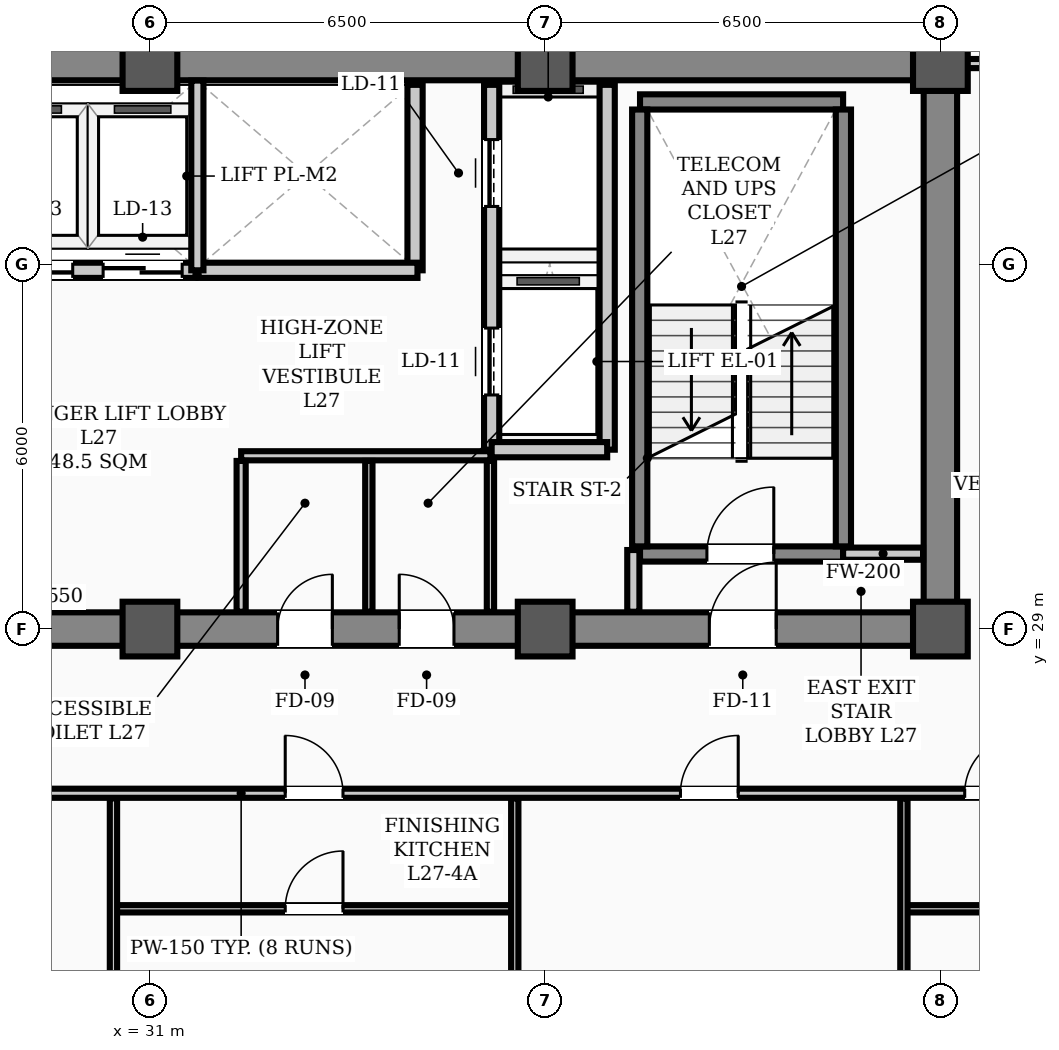
"""IFC4 building model, lengths in metres.
Left out: names, types, materials, properties, quantities, classifications, styles, units other than length and angle.
Written with IfcOpenShell. Run it as: python <this file> out.ifc"""

import sys

from ifc_helpers import new_model, si_unit, direction, frame, frame_2d, origin, origin_2d, place, context, subcontext, project, spatial, rectangle, hollow_rectangle, extrude, element, fill, save


model = new_model("IFC4")
c1 = context("Model", 3, precision=1e-05, world=origin(), true_north=direction((0.0, 1.0)))
c2 = subcontext(c1, "Body", "Model", "MODEL_VIEW")
j1 = project(units=[si_unit("LENGTHUNIT", "METRE"), si_unit("PLANEANGLEUNIT", "RADIAN")], contexts=[c1])
p1 = place(None, origin())
s1 = spatial("IfcSite", under=j1, at=p1, CompositionType="ELEMENT")
p2 = place(p1, origin())
s2 = spatial("IfcBuilding", under=s1, at=p2, CompositionType="ELEMENT")
p3 = place(p2, frame((0.0, 0.0, 111.0)))
s3 = spatial("IfcBuildingStorey", under=s2, at=p3, CompositionType="ELEMENT", Elevation=111.0)
for number, where, z_axis, x_axis in (
    (1, (31.0, 29.0, 0.0), (0.0, 0.0, 1.0), (1.0, 0.0, 0.0)),
    (2, (31.0, 38.3, 0.0), (0.0, 0.0, 1.0), (1.0, 0.0, 0.0)),
    (3, (37.5, 29.0, 0.0), (0.0, 0.0, 1.0), (1.0, 0.0, 0.0)),
    (4, (37.5, 38.3, 0.0), (0.0, 0.0, 1.0), (1.0, 0.0, 0.0)),
    (5, (44.0, 29.0, 0.0), (0.0, 0.0, 1.0), (1.0, 0.0, 0.0)),
    (6, (44.0, 38.3, 0.0), (0.0, 0.0, 1.0), (1.0, 0.0, 0.0)),
):
    element("IfcColumn", number, at=place(p3, frame(where, z_axis=z_axis, x_axis=x_axis)), inside=s3, PredefinedType="COLUMN", context=c2, shape_type="SweptSolid", body=[
        extrude(hollow_rectangle(XDim=0.9, YDim=0.9, WallThickness=0.035, InnerFilletRadius=0.017, OuterFilletRadius=0.052, at=origin_2d()), origin(), (0.0, 0.0, 1.0), 3.9),
    ])
p4 = place(p3, frame((13.5, 29.0, 0.0), z_axis=(0.0, 0.0, 1.0), x_axis=(1.0, 0.0, 0.0)))
e7 = element("IfcWall", 7, at=p4, inside=s3, PredefinedType="SHEAR", context=c2, shape_type="SweptSolid", body=[
    extrude(rectangle(XDim=30.5, YDim=0.55, at=frame_2d((15.25, 0.0))), origin(), (0.0, 0.0, 1.0), 3.66),
])
p5 = place(p4, frame((1.75, 0.0, 0.0)))
e8 = element("IfcOpeningElement", 8, at=p5, cuts=e7, PredefinedType="OPENING", context=c2, shape_type="SweptSolid", body=[
    extrude(rectangle(XDim=1.1, YDim=2.08, at=frame_2d((0.55, 1.04))), frame((0.0, 0.285, 0.0), z_axis=(0.0, -1.0, 0.0), x_axis=(1.0, 0.0, 0.0)), (0.0, 0.0, 1.0), 0.57),
])
p6 = place(p4, frame((26.7, 0.0, 0.0)))
e9 = element("IfcOpeningElement", 9, at=p6, cuts=e7, PredefinedType="OPENING", context=c2, shape_type="SweptSolid", body=[
    extrude(rectangle(XDim=1.1, YDim=2.08, at=frame_2d((0.55, 1.04))), frame((0.0, 0.285, 0.0), z_axis=(0.0, -1.0, 0.0), x_axis=(1.0, 0.0, 0.0)), (0.0, 0.0, 1.0), 0.57),
])
p7 = place(p4, frame((6.8, 0.0, 0.0)))
e10 = element("IfcOpeningElement", 10, at=p7, cuts=e7, PredefinedType="OPENING", context=c2, shape_type="SweptSolid", body=[
    extrude(rectangle(XDim=1.1, YDim=2.08, at=frame_2d((0.55, 1.04))), frame((0.0, 0.285, 0.0), z_axis=(0.0, -1.0, 0.0), x_axis=(1.0, 0.0, 0.0)), (0.0, 0.0, 1.0), 0.57),
])
p8 = place(p4, frame((13.2, 0.0, 0.0)))
e11 = element("IfcOpeningElement", 11, at=p8, cuts=e7, PredefinedType="OPENING", context=c2, shape_type="SweptSolid", body=[
    extrude(rectangle(XDim=1.6, YDim=2.08, at=frame_2d((0.8, 1.04))), frame((0.0, 0.285, 0.0), z_axis=(0.0, -1.0, 0.0), x_axis=(1.0, 0.0, 0.0)), (0.0, 0.0, 1.0), 0.57),
])
p9 = place(p4, frame((19.6, 0.0, 0.0)))
e12 = element("IfcOpeningElement", 12, at=p9, cuts=e7, PredefinedType="OPENING", context=c2, shape_type="SweptSolid", body=[
    extrude(rectangle(XDim=0.9, YDim=2.08, at=frame_2d((0.45, 1.04))), frame((0.0, 0.285, 0.0), z_axis=(0.0, -1.0, 0.0), x_axis=(1.0, 0.0, 0.0)), (0.0, 0.0, 1.0), 0.57),
])
p10 = place(p4, frame((21.6, 0.0, 0.0)))
e13 = element("IfcOpeningElement", 13, at=p10, cuts=e7, PredefinedType="OPENING", context=c2, shape_type="SweptSolid", body=[
    extrude(rectangle(XDim=0.9, YDim=2.08, at=frame_2d((0.45, 1.04))), frame((0.0, 0.285, 0.0), z_axis=(0.0, -1.0, 0.0), x_axis=(1.0, 0.0, 0.0)), (0.0, 0.0, 1.0), 0.57),
])
p11 = place(p3, frame((13.5, 38.3, 0.0), z_axis=(0.0, 0.0, 1.0), x_axis=(1.0, 0.0, 0.0)))
e14 = element("IfcWall", 14, at=p11, inside=s3, PredefinedType="SHEAR", context=c2, shape_type="SweptSolid", body=[
    extrude(rectangle(XDim=30.5, YDim=0.55, at=frame_2d((15.25, 0.0))), origin(), (0.0, 0.0, 1.0), 3.66),
])
p12 = place(p3, frame((44.0, 29.35, 0.0), z_axis=(0.0, 0.0, 1.0), x_axis=(0.0, 1.0, 0.0)))
e15 = element("IfcWall", 15, at=p12, inside=s3, PredefinedType="SHEAR", context=c2, shape_type="SweptSolid", body=[
    extrude(rectangle(XDim=8.6, YDim=0.55, at=frame_2d((4.3, 0.0))), origin(), (0.0, 0.0, 1.0), 3.66),
])
p13 = place(p3, frame((39.06, 30.235, 0.0), z_axis=(0.0, 0.0, 1.0), x_axis=(1.0, 0.0, 0.0)))
e16 = element("IfcWall", 16, at=p13, inside=s3, PredefinedType="STANDARD", context=c2, shape_type="SweptSolid", body=[
    extrude(rectangle(XDim=3.34, YDim=0.25, at=frame_2d((1.67, 0.0))), origin(), (0.0, 0.0, 1.0), 3.66),
])
p14 = place(p13, frame((1.1, 0.0, 0.0)))
e17 = element("IfcOpeningElement", 17, at=p14, cuts=e16, PredefinedType="OPENING", context=c2, shape_type="SweptSolid", body=[
    extrude(rectangle(XDim=1.1, YDim=2.08, at=frame_2d((0.55, 1.04))), frame((0.0, 0.135, 0.0), z_axis=(0.0, -1.0, 0.0), x_axis=(1.0, 0.0, 0.0)), (0.0, 0.0, 1.0), 0.27),
])
p15 = place(p3, frame((39.06, 37.669, 0.0), z_axis=(0.0, 0.0, 1.0), x_axis=(1.0, 0.0, 0.0)))
e18 = element("IfcWall", 18, at=p15, inside=s3, PredefinedType="STANDARD", context=c2, shape_type="SweptSolid", body=[
    extrude(rectangle(XDim=3.34, YDim=0.25, at=frame_2d((1.67, 0.0))), origin(), (0.0, 0.0, 1.0), 3.66),
])
for number, where, z_axis, x_axis in (
    (19, (39.055, 30.36, 0.0), (0.0, 0.0, 1.0), (0.0, 1.0, 0.0)),
    (20, (42.405, 30.36, 0.0), (0.0, 0.0, 1.0), (0.0, 1.0, 0.0)),
):
    element("IfcWall", number, at=place(p3, frame(where, z_axis=z_axis, x_axis=x_axis)), inside=s3, PredefinedType="STANDARD", context=c2, shape_type="SweptSolid", body=[
        extrude(rectangle(XDim=7.184, YDim=0.25, at=frame_2d((3.592, 0.0))), origin(), (0.0, 0.0, 1.0), 3.66),
    ])
p16 = place(p3, frame((36.62, 31.95, 0.0), z_axis=(0.0, 0.0, 1.0), x_axis=(0.0, 1.0, 0.0)))
e21 = element("IfcWall", 21, at=p16, inside=s3, PredefinedType="STANDARD", context=c2, shape_type="SweptSolid", body=[
    extrude(rectangle(XDim=6.0, YDim=0.25, at=frame_2d((3.0, 0.0))), origin(), (0.0, 0.0, 1.0), 2.24),
])
p17 = place(p16, frame((0.9, 0.0, 0.0)))
e22 = element("IfcOpeningElement", 22, at=p17, cuts=e21, PredefinedType="OPENING", context=c2, shape_type="SweptSolid", body=[
    extrude(rectangle(XDim=1.1, YDim=2.08, at=frame_2d((0.55, 1.04))), frame((0.0, 0.135, 0.0), z_axis=(0.0, -1.0, 0.0), x_axis=(1.0, 0.0, 0.0)), (0.0, 0.0, 1.0), 0.27),
])
p18 = place(p16, frame((4.0, 0.0, 0.0)))
e23 = element("IfcOpeningElement", 23, at=p18, cuts=e21, PredefinedType="OPENING", context=c2, shape_type="SweptSolid", body=[
    extrude(rectangle(XDim=1.1, YDim=2.08, at=frame_2d((0.55, 1.04))), frame((0.0, 0.135, 0.0), z_axis=(0.0, -1.0, 0.0), x_axis=(1.0, 0.0, 0.0)), (0.0, 0.0, 1.0), 0.27),
])
p19 = place(p3, frame((38.52, 31.95, 0.0), z_axis=(0.0, 0.0, 1.0), x_axis=(0.0, 1.0, 0.0)))
e24 = element("IfcWall", 24, at=p19, inside=s3, PredefinedType="STANDARD", context=c2, shape_type="SweptSolid", body=[
    extrude(rectangle(XDim=6.0, YDim=0.25, at=frame_2d((3.0, 0.0))), origin(), (0.0, 0.0, 1.0), 2.24),
])
p20 = place(p3, frame((36.62, 31.95, 0.0), z_axis=(0.0, 0.0, 1.0), x_axis=(1.0, 0.0, 0.0)))
e25 = element("IfcWall", 25, at=p20, inside=s3, PredefinedType="STANDARD", context=c2, shape_type="SweptSolid", body=[
    extrude(rectangle(XDim=1.9, YDim=0.25, at=frame_2d((0.95, 0.0))), origin(), (0.0, 0.0, 1.0), 3.48),
])
p21 = place(p3, frame((35.36, 34.9, 0.0), z_axis=(0.0, 0.0, 1.0), x_axis=(0.0, 1.0, 0.0)))
e26 = element("IfcWall", 26, at=p21, inside=s3, PredefinedType="STANDARD", context=c2, shape_type="SweptSolid", body=[
    extrude(rectangle(XDim=3.05, YDim=0.25, at=frame_2d((1.525, 0.0))), origin(), (0.0, 0.0, 1.0), 2.24),
])
p22 = place(p3, frame((28.2, 34.9, 0.0), z_axis=(0.0, 0.0, 1.0), x_axis=(1.0, 0.0, 0.0)))
e27 = element("IfcWall", 27, at=p22, inside=s3, PredefinedType="STANDARD", context=c2, shape_type="SweptSolid", body=[
    extrude(rectangle(XDim=3.55, YDim=0.25, at=frame_2d((1.775, 0.0))), origin(), (0.0, 0.0, 1.0), 3.66),
])
p23 = place(p22, frame((0.23, 0.0, 0.0)))
e28 = element("IfcOpeningElement", 28, at=p23, cuts=e27, PredefinedType="OPENING", context=c2, shape_type="SweptSolid", body=[
    extrude(rectangle(XDim=1.3, YDim=2.08, at=frame_2d((0.65, 1.04))), frame((0.0, 0.135, 0.0), z_axis=(0.0, -1.0, 0.0), x_axis=(1.0, 0.0, 0.0)), (0.0, 0.0, 1.0), 0.27),
])
p24 = place(p22, frame((2.03, 0.0, 0.0)))
e29 = element("IfcOpeningElement", 29, at=p24, cuts=e27, PredefinedType="OPENING", context=c2, shape_type="SweptSolid", body=[
    extrude(rectangle(XDim=1.3, YDim=2.08, at=frame_2d((0.65, 1.04))), frame((0.0, 0.135, 0.0), z_axis=(0.0, -1.0, 0.0), x_axis=(1.0, 0.0, 0.0)), (0.0, 0.0, 1.0), 0.27),
])
p25 = place(p3, frame((31.8, 34.9, 0.0), z_axis=(0.0, 0.0, 1.0), x_axis=(1.0, 0.0, 0.0)))
e30 = element("IfcWall", 30, at=p25, inside=s3, PredefinedType="STANDARD", context=c2, shape_type="SweptSolid", body=[
    extrude(rectangle(XDim=3.6, YDim=0.25, at=frame_2d((1.8, 0.0))), origin(), (0.0, 0.0, 1.0), 3.66),
])
p26 = place(p3, frame((42.4, 30.24, 0.0), z_axis=(0.0, 0.0, 1.0), x_axis=(1.0, 0.0, 0.0)))
e31 = element("IfcWall", 31, at=p26, inside=s3, PredefinedType="STANDARD", context=c2, shape_type="SweptSolid", body=[
    extrude(rectangle(XDim=1.315, YDim=0.2, at=frame_2d((0.658, 0.0))), origin(), (0.0, 0.0, 1.0), 2.24),
])
p27 = place(p3, frame((32.5, 31.85, 0.0), z_axis=(0.0, 0.0, 1.0), x_axis=(1.0, 0.0, 0.0)))
e32 = element("IfcWall", 32, at=p27, inside=s3, PredefinedType="PARTITIONING", context=c2, shape_type="SweptSolid", body=[
    extrude(rectangle(XDim=4.1, YDim=0.15, at=frame_2d((2.05, 0.0))), origin(), (0.0, 0.0, 1.0), 3.66),
])
p28 = place(p3, frame((7.81, 26.3, 0.0), z_axis=(0.0, 0.0, 1.0), x_axis=(1.0, 0.0, 0.0)))
e33 = element("IfcWall", 33, at=p28, inside=s3, PredefinedType="PARTITIONING", context=c2, shape_type="SweptSolid", body=[
    extrude(rectangle(XDim=49.38, YDim=0.15, at=frame_2d((24.69, 0.0))), origin(), (0.0, 0.0, 1.0), 2.24),
])
p29 = place(p28, frame((6.89, 0.0, 0.0)))
e34 = element("IfcOpeningElement", 34, at=p29, cuts=e33, PredefinedType="OPENING", context=c2, shape_type="SweptSolid", body=[
    extrude(rectangle(XDim=0.95, YDim=2.08, at=frame_2d((0.475, 1.04))), frame((0.0, 0.085, 0.0), z_axis=(0.0, -1.0, 0.0), x_axis=(1.0, 0.0, 0.0)), (0.0, 0.0, 1.0), 0.17),
])
p30 = place(p28, frame((12.315, 0.0, 0.0)))
e35 = element("IfcOpeningElement", 35, at=p30, cuts=e33, PredefinedType="OPENING", context=c2, shape_type="SweptSolid", body=[
    extrude(rectangle(XDim=0.95, YDim=2.08, at=frame_2d((0.475, 1.04))), frame((0.0, 0.085, 0.0), z_axis=(0.0, -1.0, 0.0), x_axis=(1.0, 0.0, 0.0)), (0.0, 0.0, 1.0), 0.17),
])
p31 = place(p28, frame((18.815, 0.0, 0.0)))
e36 = element("IfcOpeningElement", 36, at=p31, cuts=e33, PredefinedType="OPENING", context=c2, shape_type="SweptSolid", body=[
    extrude(rectangle(XDim=0.95, YDim=2.08, at=frame_2d((0.475, 1.04))), frame((0.0, 0.085, 0.0), z_axis=(0.0, -1.0, 0.0), x_axis=(1.0, 0.0, 0.0)), (0.0, 0.0, 1.0), 0.17),
])
p32 = place(p28, frame((25.415, 0.0, 0.0)))
e37 = element("IfcOpeningElement", 37, at=p32, cuts=e33, PredefinedType="OPENING", context=c2, shape_type="SweptSolid", body=[
    extrude(rectangle(XDim=0.95, YDim=2.08, at=frame_2d((0.475, 1.04))), frame((0.0, 0.085, 0.0), z_axis=(0.0, -1.0, 0.0), x_axis=(1.0, 0.0, 0.0)), (0.0, 0.0, 1.0), 0.17),
])
p33 = place(p28, frame((31.915, 0.0, 0.0)))
e38 = element("IfcOpeningElement", 38, at=p33, cuts=e33, PredefinedType="OPENING", context=c2, shape_type="SweptSolid", body=[
    extrude(rectangle(XDim=0.95, YDim=2.08, at=frame_2d((0.475, 1.04))), frame((0.0, 0.085, 0.0), z_axis=(0.0, -1.0, 0.0), x_axis=(1.0, 0.0, 0.0)), (0.0, 0.0, 1.0), 0.17),
])
p34 = place(p28, frame((36.59, 0.0, 0.0)))
e39 = element("IfcOpeningElement", 39, at=p34, cuts=e33, PredefinedType="OPENING", context=c2, shape_type="SweptSolid", body=[
    extrude(rectangle(XDim=0.95, YDim=2.08, at=frame_2d((0.475, 1.04))), frame((0.0, 0.085, 0.0), z_axis=(0.0, -1.0, 0.0), x_axis=(1.0, 0.0, 0.0)), (0.0, 0.0, 1.0), 0.17),
])
p35 = place(p3, frame((44.0, 38.3, 0.0), z_axis=(0.0, 0.0, 1.0), x_axis=(1.0, 0.0, 0.0)))
e40 = element("IfcWall", 40, at=p35, inside=s3, PredefinedType="PARTITIONING", context=c2, shape_type="SweptSolid", body=[
    extrude(rectangle(XDim=13.19, YDim=0.15, at=frame_2d((6.595, 0.0))), origin(), (0.0, 0.0, 1.0), 2.24),
])
p36 = place(p3, frame((30.4, 24.4, 0.0), z_axis=(0.0, 0.0, 1.0), x_axis=(1.0, 0.0, 0.0)))
e41 = element("IfcWall", 41, at=p36, inside=s3, PredefinedType="PARTITIONING", context=c2, shape_type="SweptSolid", body=[
    extrude(rectangle(XDim=6.6, YDim=0.12, at=frame_2d((3.3, 0.0))), origin(), (0.0, 0.0, 1.0), 2.24),
])
p37 = place(p36, frame((2.825, 0.0, 0.0)))
e42 = element("IfcOpeningElement", 42, at=p37, cuts=e41, PredefinedType="OPENING", context=c2, shape_type="SweptSolid", body=[
    extrude(rectangle(XDim=0.95, YDim=2.08, at=frame_2d((0.475, 1.04))), frame((0.0, 0.07, 0.0), z_axis=(0.0, -1.0, 0.0), x_axis=(1.0, 0.0, 0.0)), (0.0, 0.0, 1.0), 0.14),
])
p38 = place(p3, frame((43.4, 24.4, 0.0), z_axis=(0.0, 0.0, 1.0), x_axis=(1.0, 0.0, 0.0)))
e43 = element("IfcWall", 43, at=p38, inside=s3, PredefinedType="PARTITIONING", context=c2, shape_type="SweptSolid", body=[
    extrude(rectangle(XDim=13.79, YDim=0.12, at=frame_2d((6.895, 0.0))), origin(), (0.0, 0.0, 1.0), 2.24),
])
p39 = place(p38, frame((6.42, 0.0, 0.0)))
e44 = element("IfcOpeningElement", 44, at=p39, cuts=e43, PredefinedType="OPENING", context=c2, shape_type="SweptSolid", body=[
    extrude(rectangle(XDim=0.95, YDim=2.08, at=frame_2d((0.475, 1.04))), frame((0.0, 0.07, 0.0), z_axis=(0.0, -1.0, 0.0), x_axis=(1.0, 0.0, 0.0)), (0.0, 0.0, 1.0), 0.14),
])
p40 = place(p3, frame((38.95, 29.285, 0.0), z_axis=(0.0, 0.0, 1.0), x_axis=(0.0, 1.0, 0.0)))
e45 = element("IfcWall", 45, at=p40, inside=s3, PredefinedType="STANDARD", context=c2, shape_type="SweptSolid", body=[
    extrude(rectangle(XDim=1.015, YDim=0.2, at=frame_2d((0.508, 0.0))), origin(), (0.0, 0.0, 1.0), 2.24),
])
p41 = place(p3, frame((32.5, 29.285, 0.0), z_axis=(0.0, 0.0, 1.0), x_axis=(0.0, 1.0, 0.0)))
e46 = element("IfcWall", 46, at=p41, inside=s3, PredefinedType="PARTITIONING", context=c2, shape_type="SweptSolid", body=[
    extrude(rectangle(XDim=2.48, YDim=0.15, at=frame_2d((1.24, 0.0))), origin(), (0.0, 0.0, 1.0), 2.24),
])
for number, where, z_axis, x_axis in (
    (47, (36.6, 29.285, 0.0), (0.0, 0.0, 1.0), (0.0, 1.0, 0.0)),
    (48, (34.6, 29.285, 0.0), (0.0, 0.0, 1.0), (0.0, 1.0, 0.0)),
):
    element("IfcWall", number, at=place(p3, frame(where, z_axis=z_axis, x_axis=x_axis)), inside=s3, PredefinedType="PARTITIONING", context=c2, shape_type="SweptSolid", body=[
        extrude(rectangle(XDim=2.48, YDim=0.12, at=frame_2d((1.24, 0.0))), origin(), (0.0, 0.0, 1.0), 2.24),
    ])
for number, where, z_axis, x_axis in (
    (49, (30.4, 9.81, 0.0), (0.0, 0.0, 1.0), (0.0, 1.0, 0.0)),
    (50, (37.0, 9.81, 0.0), (0.0, 0.0, 1.0), (0.0, 1.0, 0.0)),
    (51, (43.4, 9.81, 0.0), (0.0, 0.0, 1.0), (0.0, 1.0, 0.0)),
):
    element("IfcWall", number, at=place(p3, frame(where, z_axis=z_axis, x_axis=x_axis)), inside=s3, PredefinedType="PARTITIONING", context=c2, shape_type="SweptSolid", body=[
        extrude(rectangle(XDim=16.405, YDim=0.12, at=frame_2d((8.203, 0.0))), origin(), (0.0, 0.0, 1.0), 2.24),
    ])
p42 = place(p3, frame((31.78, 34.9, 0.0), z_axis=(0.0, 0.0, 1.0), x_axis=(0.0, 1.0, 0.0)))
e52 = element("IfcWall", 52, at=p42, inside=s3, PredefinedType="STANDARD", context=c2, shape_type="SweptSolid", body=[
    extrude(rectangle(XDim=3.12, YDim=0.2, at=frame_2d((1.56, 0.0))), origin(), (0.0, 0.0, 1.0), 2.24),
])
p43 = place(p14, origin())
e53 = element("IfcDoor", 53, at=p43, inside=s3, OperationType="SINGLE_SWING_RIGHT", PredefinedType="DOOR", context=c2, shape_type="SweptSolid", body=[
    extrude(rectangle(XDim=1.1, YDim=2.08, at=frame_2d((0.55, 1.04))), frame((0.0, 0.025, 0.0), z_axis=(0.0, -1.0, 0.0), x_axis=(1.0, 0.0, 0.0)), (0.0, 0.0, 1.0), 0.05),
])
fill(e17, e53)
p44 = place(p6, origin())
e54 = element("IfcDoor", 54, at=p44, inside=s3, OperationType="SINGLE_SWING_RIGHT", PredefinedType="DOOR", context=c2, shape_type="SweptSolid", body=[
    extrude(rectangle(XDim=1.1, YDim=2.08, at=frame_2d((0.55, 1.04))), frame((0.0, 0.025, 0.0), z_axis=(0.0, -1.0, 0.0), x_axis=(1.0, 0.0, 0.0)), (0.0, 0.0, 1.0), 0.05),
])
fill(e9, e54)
p45 = place(p9, origin())
e55 = element("IfcDoor", 55, at=p45, inside=s3, OperationType="SINGLE_SWING_RIGHT", PredefinedType="DOOR", context=c2, shape_type="SweptSolid", body=[
    extrude(rectangle(XDim=0.9, YDim=2.08, at=frame_2d((0.45, 1.04))), frame((0.0, 0.025, 0.0), z_axis=(0.0, -1.0, 0.0), x_axis=(1.0, 0.0, 0.0)), (0.0, 0.0, 1.0), 0.05),
])
fill(e12, e55)
p46 = place(p10, origin())
e56 = element("IfcDoor", 56, at=p46, inside=s3, OperationType="SINGLE_SWING_LEFT", PredefinedType="DOOR", context=c2, shape_type="SweptSolid", body=[
    extrude(rectangle(XDim=0.9, YDim=2.08, at=frame_2d((0.45, 1.04))), frame((0.0, 0.025, 0.0), z_axis=(0.0, -1.0, 0.0), x_axis=(1.0, 0.0, 0.0)), (0.0, 0.0, 1.0), 0.05),
])
fill(e13, e56)
p47 = place(p37, origin())
e57 = element("IfcDoor", 57, at=p47, inside=s3, OperationType="SINGLE_SWING_RIGHT", PredefinedType="DOOR", context=c2, shape_type="SweptSolid", body=[
    extrude(rectangle(XDim=0.95, YDim=2.08, at=frame_2d((0.475, 1.04))), frame((0.0, 0.025, 0.0), z_axis=(0.0, -1.0, 0.0), x_axis=(1.0, 0.0, 0.0)), (0.0, 0.0, 1.0), 0.05),
])
fill(e42, e57)
p48 = place(p32, origin())
e58 = element("IfcDoor", 58, at=p48, inside=s3, OperationType="SINGLE_SWING_LEFT", PredefinedType="DOOR", context=c2, shape_type="SweptSolid", body=[
    extrude(rectangle(XDim=0.95, YDim=2.08, at=frame_2d((0.475, 1.04))), frame((0.0, 0.025, 0.0), z_axis=(0.0, -1.0, 0.0), x_axis=(1.0, 0.0, 0.0)), (0.0, 0.0, 1.0), 0.05),
])
fill(e37, e58)
p49 = place(p33, origin())
e59 = element("IfcDoor", 59, at=p49, inside=s3, OperationType="SINGLE_SWING_RIGHT", PredefinedType="DOOR", context=c2, shape_type="SweptSolid", body=[
    extrude(rectangle(XDim=0.95, YDim=2.08, at=frame_2d((0.475, 1.04))), frame((0.0, 0.025, 0.0), z_axis=(0.0, -1.0, 0.0), x_axis=(1.0, 0.0, 0.0)), (0.0, 0.0, 1.0), 0.05),
])
fill(e38, e59)
p50 = place(p34, origin())
e60 = element("IfcDoor", 60, at=p50, inside=s3, OperationType="SINGLE_SWING_RIGHT", PredefinedType="DOOR", context=c2, shape_type="SweptSolid", body=[
    extrude(rectangle(XDim=0.95, YDim=2.08, at=frame_2d((0.475, 1.04))), frame((0.0, 0.025, 0.0), z_axis=(0.0, -1.0, 0.0), x_axis=(1.0, 0.0, 0.0)), (0.0, 0.0, 1.0), 0.05),
])
fill(e39, e60)
p51 = place(p17, origin())
e61 = element("IfcDoor", 61, at=p51, inside=s3, OperationType="SLIDING_TO_LEFT", PredefinedType="DOOR", context=c2, shape_type="SweptSolid", body=[
    extrude(rectangle(XDim=1.1, YDim=2.08, at=frame_2d((0.55, 1.04))), frame((0.0, 0.025, 0.0), z_axis=(0.0, -1.0, 0.0), x_axis=(1.0, 0.0, 0.0)), (0.0, 0.0, 1.0), 0.05),
])
fill(e22, e61)
p52 = place(p18, origin())
e62 = element("IfcDoor", 62, at=p52, inside=s3, OperationType="SLIDING_TO_LEFT", PredefinedType="DOOR", context=c2, shape_type="SweptSolid", body=[
    extrude(rectangle(XDim=1.1, YDim=2.08, at=frame_2d((0.55, 1.04))), frame((0.0, 0.025, 0.0), z_axis=(0.0, -1.0, 0.0), x_axis=(1.0, 0.0, 0.0)), (0.0, 0.0, 1.0), 0.05),
])
fill(e23, e62)
p53 = place(p23, origin())
e63 = element("IfcDoor", 63, at=p53, inside=s3, OperationType="DOUBLE_DOOR_SLIDING", PredefinedType="DOOR", context=c2, shape_type="SweptSolid", body=[
    extrude(rectangle(XDim=1.3, YDim=2.08, at=frame_2d((0.65, 1.04))), frame((0.0, 0.025, 0.0), z_axis=(0.0, -1.0, 0.0), x_axis=(1.0, 0.0, 0.0)), (0.0, 0.0, 1.0), 0.05),
])
fill(e28, e63)
p54 = place(p24, origin())
e64 = element("IfcDoor", 64, at=p54, inside=s3, OperationType="DOUBLE_DOOR_SLIDING", PredefinedType="DOOR", context=c2, shape_type="SweptSolid", body=[
    extrude(rectangle(XDim=1.3, YDim=2.08, at=frame_2d((0.65, 1.04))), frame((0.0, 0.025, 0.0), z_axis=(0.0, -1.0, 0.0), x_axis=(1.0, 0.0, 0.0)), (0.0, 0.0, 1.0), 0.05),
])
fill(e29, e64)
save(model, sys.argv[1])
